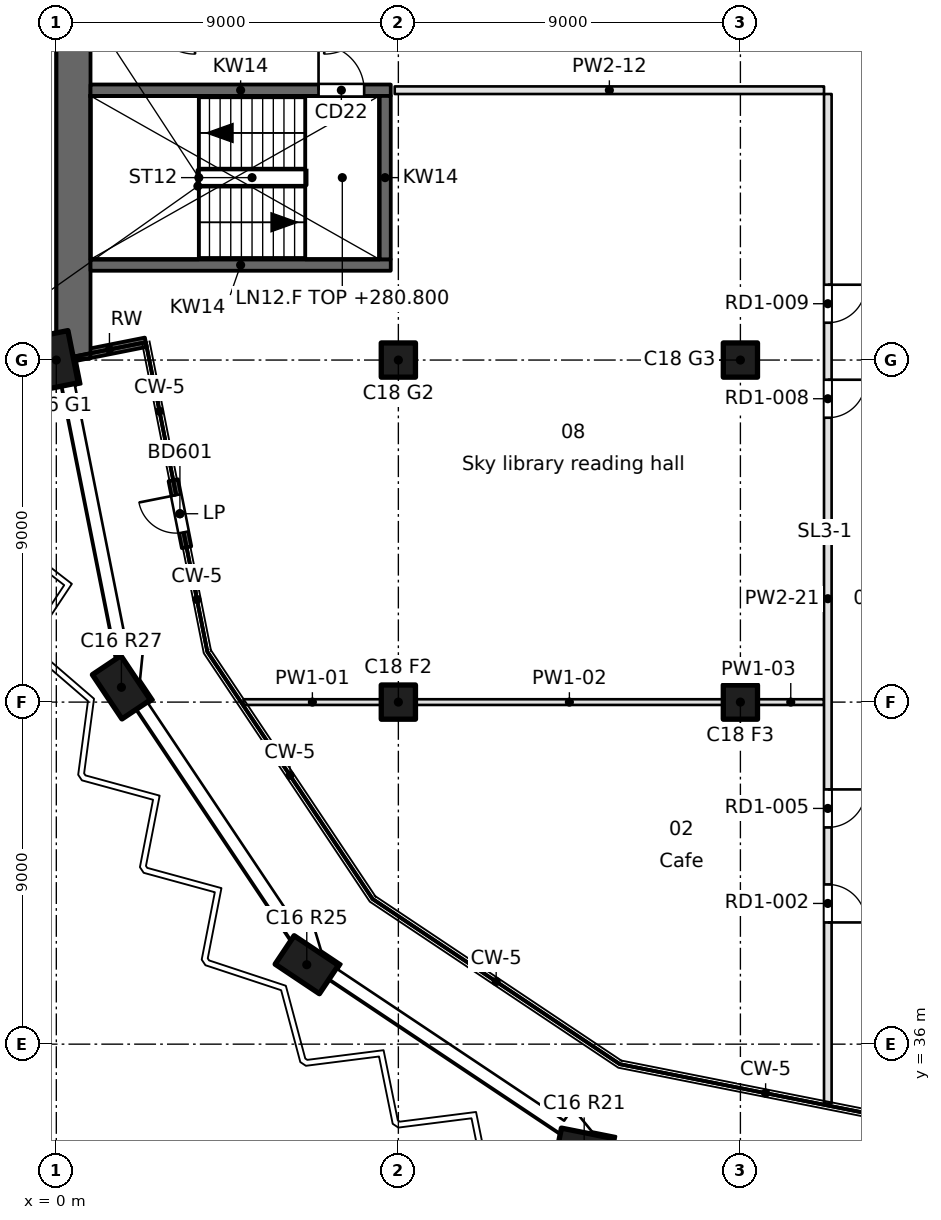
"""IFC4 building model, lengths in metres.
Left out: names, types, materials, properties, quantities, classifications, styles, units other than length and angle.
Written with IfcOpenShell. Run it as: python <this file> out.ifc"""

import sys

from ifc_helpers import new_model, si_unit, direction, frame, frame_2d, origin, origin_2d, place, context, subcontext, project, spatial, rectangle, extrude, element, fill, save


model = new_model("IFC4")
c1 = context("Model", 3, precision=1e-05, world=origin(), true_north=direction((0.0, 1.0)))
c2 = subcontext(c1, "Body", "Model", "MODEL_VIEW")
j1 = project(units=[si_unit("LENGTHUNIT", "METRE"), si_unit("PLANEANGLEUNIT", "RADIAN")], contexts=[c1])
p1 = place(None, origin())
s1 = spatial("IfcSite", under=j1, at=p1, CompositionType="ELEMENT")
p2 = place(p1, origin())
s2 = spatial("IfcBuilding", under=s1, at=p2, CompositionType="ELEMENT")
p3 = place(p2, frame((0.0, 0.0, 280.8)))
s3 = spatial("IfcBuildingStorey", under=s2, at=p3, CompositionType="ELEMENT", Elevation=280.8)
for number, where, z_axis, x_axis in (
    (1, (13.89, 33.213, 0.0), (0.0, 0.0, 1.0), (-0.981, 0.195, 0.0)),
    (2, (6.59, 38.09, 0.0), (0.0, 0.0, 1.0), (-0.831, 0.556, 0.0)),
    (3, (1.713, 45.39, 0.0), (0.0, 0.0, 1.0), (-0.556, 0.831, 0.0)),
    (4, (0.0, 54.0, 0.0), (0.0, 0.0, 1.0), (-0.195, 0.981, 0.0)),
):
    element("IfcColumn", number, at=place(p3, frame(where, z_axis=z_axis, x_axis=x_axis)), inside=s3, PredefinedType="COLUMN", context=c2, shape_type="SweptSolid", body=[
        extrude(rectangle(XDim=1.4, YDim=0.9, at=origin_2d()), origin(), (0.0, 0.0, 1.0), 3.7),
    ])
for number, where, z_axis, x_axis in (
    (5, (9.0, 45.0, 0.0), (0.0, 0.0, 1.0), (1.0, 0.0, 0.0)),
    (6, (9.0, 54.0, 0.0), (0.0, 0.0, 1.0), (1.0, 0.0, 0.0)),
    (7, (18.0, 45.0, 0.0), (0.0, 0.0, 1.0), (1.0, 0.0, 0.0)),
    (8, (18.0, 54.0, 0.0), (0.0, 0.0, 1.0), (1.0, 0.0, 0.0)),
):
    element("IfcColumn", number, at=place(p3, frame(where, z_axis=z_axis, x_axis=x_axis)), inside=s3, PredefinedType="COLUMN", context=c2, shape_type="SweptSolid", body=[
        extrude(rectangle(XDim=0.9, YDim=0.9, at=origin_2d()), origin(), (0.0, 0.0, 1.0), 3.7),
    ])
p4 = place(p3, frame((0.45, 94.5, 0.0), z_axis=(0.0, 0.0, 1.0), x_axis=(0.0, -1.0, 0.0)))
e9 = element("IfcWall", 9, at=p4, inside=s3, PredefinedType="SHEAR", context=c2, shape_type="SweptSolid", body=[
    extrude(rectangle(XDim=40.456, YDim=0.9, at=frame_2d((20.228, 0.0))), origin(), (0.0, 0.0, 1.0), 3.7),
])
p5 = place(p3, frame((0.441, 54.089, 0.0), z_axis=(0.0, 0.0, 1.0), x_axis=(0.980834936053, 0.194840519958, 0.0)))
e10 = element("IfcWall", 10, at=p5, inside=s3, PredefinedType="SOLIDWALL", context=c2, shape_type="SweptSolid", body=[
    extrude(rectangle(XDim=1.951, YDim=0.25, at=frame_2d((0.976, 0.0))), origin(), (0.0, 0.0, 1.0), 3.3),
])
p6 = place(p3, frame((3.077, 50.839, 0.0), z_axis=(0.0, 0.0, 1.0), x_axis=(0.195046569833, -0.980793982239, 0.0)))
e11 = element("IfcWall", 11, at=p6, inside=s3, PredefinedType="SOLIDWALL", context=c2, shape_type="SweptSolid", body=[
    extrude(rectangle(XDim=1.8, YDim=0.25, at=frame_2d((0.9, 0.0))), origin(), (0.0, 0.0, 1.0), 3.3),
])
p7 = place(p6, frame((0.4, 0.0, 0.0)))
e12 = element("IfcOpeningElement", 12, at=p7, cuts=e11, PredefinedType="OPENING", context=c2, shape_type="SweptSolid", body=[
    extrude(rectangle(XDim=1.0, YDim=2.1, at=frame_2d((0.5, 1.05))), frame((0.0, 0.125, 0.0), z_axis=(0.0, -1.0, 0.0), x_axis=(1.0, 0.0, 0.0)), (0.0, 0.0, 1.0), 0.25),
])
p8 = place(p3, frame((0.9, 56.5, -0.4), z_axis=(0.0, 0.0, 1.0), x_axis=(1.0, 0.0, 0.0)))
e13 = element("IfcWall", 13, at=p8, inside=s3, PredefinedType="SOLIDWALL", context=c2, shape_type="SweptSolid", body=[
    extrude(rectangle(XDim=7.9, YDim=0.3, at=frame_2d((3.95, 0.0))), origin(), (0.0, 0.0, 1.0), 3.7),
])
p9 = place(p3, frame((0.9, 61.1, -0.4), z_axis=(0.0, 0.0, 1.0), x_axis=(1.0, 0.0, 0.0)))
e14 = element("IfcWall", 14, at=p9, inside=s3, PredefinedType="SOLIDWALL", context=c2, shape_type="SweptSolid", body=[
    extrude(rectangle(XDim=7.9, YDim=0.3, at=frame_2d((3.95, 0.0))), origin(), (0.0, 0.0, 1.0), 3.7),
])
p10 = place(p9, frame((6.0, 0.0, 0.4)))
e15 = element("IfcOpeningElement", 15, at=p10, cuts=e14, PredefinedType="OPENING", context=c2, shape_type="SweptSolid", body=[
    extrude(rectangle(XDim=1.2, YDim=2.1, at=frame_2d((0.6, 1.05))), frame((0.0, 0.15, 0.0), z_axis=(0.0, -1.0, 0.0), x_axis=(1.0, 0.0, 0.0)), (0.0, 0.0, 1.0), 0.3),
])
p11 = place(p3, frame((8.65, 56.65, -0.4), z_axis=(0.0, 0.0, 1.0), x_axis=(0.0, 1.0, 0.0)))
e16 = element("IfcWall", 16, at=p11, inside=s3, PredefinedType="SOLIDWALL", context=c2, shape_type="SweptSolid", body=[
    extrude(rectangle(XDim=4.3, YDim=0.3, at=frame_2d((2.15, 0.0))), origin(), (0.0, 0.0, 1.0), 3.7),
])
p12 = place(p3, frame((4.926, 45.0, 0.0), z_axis=(0.0, 0.0, 1.0), x_axis=(1.0, 0.0, 0.0)))
e17 = element("IfcWall", 17, at=p12, inside=s3, PredefinedType="PARTITIONING", context=c2, shape_type="SweptSolid", body=[
    extrude(rectangle(XDim=3.625, YDim=0.15, at=frame_2d((1.812, 0.0))), origin(), (0.0, 0.0, 1.0), 3.3),
])
p13 = place(p3, frame((9.45, 45.0, 0.0), z_axis=(0.0, 0.0, 1.0), x_axis=(1.0, 0.0, 0.0)))
e18 = element("IfcWall", 18, at=p13, inside=s3, PredefinedType="PARTITIONING", context=c2, shape_type="SweptSolid", body=[
    extrude(rectangle(XDim=8.1, YDim=0.15, at=frame_2d((4.05, 0.0))), origin(), (0.0, 0.0, 1.0), 3.3),
])
p14 = place(p3, frame((18.45, 45.0, 0.0), z_axis=(0.0, 0.0, 1.0), x_axis=(1.0, 0.0, 0.0)))
e19 = element("IfcWall", 19, at=p14, inside=s3, PredefinedType="PARTITIONING", context=c2, shape_type="SweptSolid", body=[
    extrude(rectangle(XDim=1.75, YDim=0.15, at=frame_2d((0.875, 0.0))), origin(), (0.0, 0.0, 1.0), 3.3),
])
p15 = place(p3, frame((20.2, 61.1, 0.0), z_axis=(0.0, 0.0, 1.0), x_axis=(-1.0, 0.0, 0.0)))
e20 = element("IfcWall", 20, at=p15, inside=s3, PredefinedType="PARTITIONING", context=c2, shape_type="SweptSolid", body=[
    extrude(rectangle(XDim=11.296, YDim=0.2, at=frame_2d((5.648, 0.0))), origin(), (0.0, 0.0, 1.0), 3.3),
])
p16 = place(p3, frame((20.3, 34.441, 0.0), z_axis=(0.0, 0.0, 1.0), x_axis=(0.0, 1.0, 0.0)))
e21 = element("IfcWall", 21, at=p16, inside=s3, PredefinedType="PARTITIONING", context=c2, shape_type="SweptSolid", body=[
    extrude(rectangle(XDim=26.559, YDim=0.2, at=frame_2d((13.28, 0.0))), origin(), (0.0, 0.0, 1.0), 3.3),
])
p17 = place(p16, frame((4.762, 0.0, 0.0)))
e22 = element("IfcOpeningElement", 22, at=p17, cuts=e21, PredefinedType="OPENING", context=c2, shape_type="SweptSolid", body=[
    extrude(rectangle(XDim=1.0, YDim=2.1, at=frame_2d((0.5, 1.05))), frame((0.0, 0.1, 0.0), z_axis=(0.0, -1.0, 0.0), x_axis=(1.0, 0.0, 0.0)), (0.0, 0.0, 1.0), 0.2),
])
p18 = place(p16, frame((7.262, 0.0, 0.0)))
e23 = element("IfcOpeningElement", 23, at=p18, cuts=e21, PredefinedType="OPENING", context=c2, shape_type="SweptSolid", body=[
    extrude(rectangle(XDim=1.0, YDim=2.1, at=frame_2d((0.5, 1.05))), frame((0.0, 0.1, 0.0), z_axis=(0.0, -1.0, 0.0), x_axis=(1.0, 0.0, 0.0)), (0.0, 0.0, 1.0), 0.2),
])
p19 = place(p16, frame((18.042, 0.0, 0.0)))
e24 = element("IfcOpeningElement", 24, at=p19, cuts=e21, PredefinedType="OPENING", context=c2, shape_type="SweptSolid", body=[
    extrude(rectangle(XDim=1.0, YDim=2.1, at=frame_2d((0.5, 1.05))), frame((0.0, 0.1, 0.0), z_axis=(0.0, -1.0, 0.0), x_axis=(1.0, 0.0, 0.0)), (0.0, 0.0, 1.0), 0.2),
])
p20 = place(p16, frame((20.542, 0.0, 0.0)))
e25 = element("IfcOpeningElement", 25, at=p20, cuts=e21, PredefinedType="OPENING", context=c2, shape_type="SweptSolid", body=[
    extrude(rectangle(XDim=1.0, YDim=2.1, at=frame_2d((0.5, 1.05))), frame((0.0, 0.1, 0.0), z_axis=(0.0, -1.0, 0.0), x_axis=(1.0, 0.0, 0.0)), (0.0, 0.0, 1.0), 0.2),
])
p21 = place(p7, frame((1.0, 0.0, 0.0), z_axis=(0.0, 0.0, 1.0), x_axis=(-1.0, 0.0, 0.0)))
e26 = element("IfcDoor", 26, at=p21, inside=s3, OperationType="SINGLE_SWING_RIGHT", PredefinedType="DOOR", context=c2, shape_type="SweptSolid", body=[
    extrude(rectangle(XDim=1.0, YDim=2.1, at=frame_2d((0.5, 1.05))), frame((0.0, 0.025, 0.0), z_axis=(0.0, -1.0, 0.0), x_axis=(1.0, 0.0, 0.0)), (0.0, 0.0, 1.0), 0.05),
])
fill(e12, e26)
p22 = place(p10, origin())
e27 = element("IfcDoor", 27, at=p22, inside=s3, OperationType="SINGLE_SWING_LEFT", PredefinedType="DOOR", context=c2, shape_type="SweptSolid", body=[
    extrude(rectangle(XDim=1.2, YDim=2.1, at=frame_2d((0.6, 1.05))), frame((0.0, 0.025, 0.0), z_axis=(0.0, -1.0, 0.0), x_axis=(1.0, 0.0, 0.0)), (0.0, 0.0, 1.0), 0.05),
])
fill(e15, e27)
p23 = place(p17, frame((1.0, 0.0, 0.0), z_axis=(0.0, 0.0, 1.0), x_axis=(-1.0, 0.0, 0.0)))
e28 = element("IfcDoor", 28, at=p23, inside=s3, OperationType="SINGLE_SWING_RIGHT", PredefinedType="DOOR", context=c2, shape_type="SweptSolid", body=[
    extrude(rectangle(XDim=1.0, YDim=2.1, at=frame_2d((0.5, 1.05))), frame((0.0, 0.025, 0.0), z_axis=(0.0, -1.0, 0.0), x_axis=(1.0, 0.0, 0.0)), (0.0, 0.0, 1.0), 0.05),
])
fill(e22, e28)
p24 = place(p18, frame((1.0, 0.0, 0.0), z_axis=(0.0, 0.0, 1.0), x_axis=(-1.0, 0.0, 0.0)))
e29 = element("IfcDoor", 29, at=p24, inside=s3, OperationType="SINGLE_SWING_LEFT", PredefinedType="DOOR", context=c2, shape_type="SweptSolid", body=[
    extrude(rectangle(XDim=1.0, YDim=2.1, at=frame_2d((0.5, 1.05))), frame((0.0, 0.025, 0.0), z_axis=(0.0, -1.0, 0.0), x_axis=(1.0, 0.0, 0.0)), (0.0, 0.0, 1.0), 0.05),
])
fill(e23, e29)
p25 = place(p19, frame((1.0, 0.0, 0.0), z_axis=(0.0, 0.0, 1.0), x_axis=(-1.0, 0.0, 0.0)))
e30 = element("IfcDoor", 30, at=p25, inside=s3, OperationType="SINGLE_SWING_LEFT", PredefinedType="DOOR", context=c2, shape_type="SweptSolid", body=[
    extrude(rectangle(XDim=1.0, YDim=2.1, at=frame_2d((0.5, 1.05))), frame((0.0, 0.025, 0.0), z_axis=(0.0, -1.0, 0.0), x_axis=(1.0, 0.0, 0.0)), (0.0, 0.0, 1.0), 0.05),
])
fill(e24, e30)
p26 = place(p20, frame((1.0, 0.0, 0.0), z_axis=(0.0, 0.0, 1.0), x_axis=(-1.0, 0.0, 0.0)))
e31 = element("IfcDoor", 31, at=p26, inside=s3, OperationType="SINGLE_SWING_LEFT", PredefinedType="DOOR", context=c2, shape_type="SweptSolid", body=[
    extrude(rectangle(XDim=1.0, YDim=2.1, at=frame_2d((0.5, 1.05))), frame((0.0, 0.025, 0.0), z_axis=(0.0, -1.0, 0.0), x_axis=(1.0, 0.0, 0.0)), (0.0, 0.0, 1.0), 0.05),
])
fill(e25, e31)
save(model, sys.argv[1])
